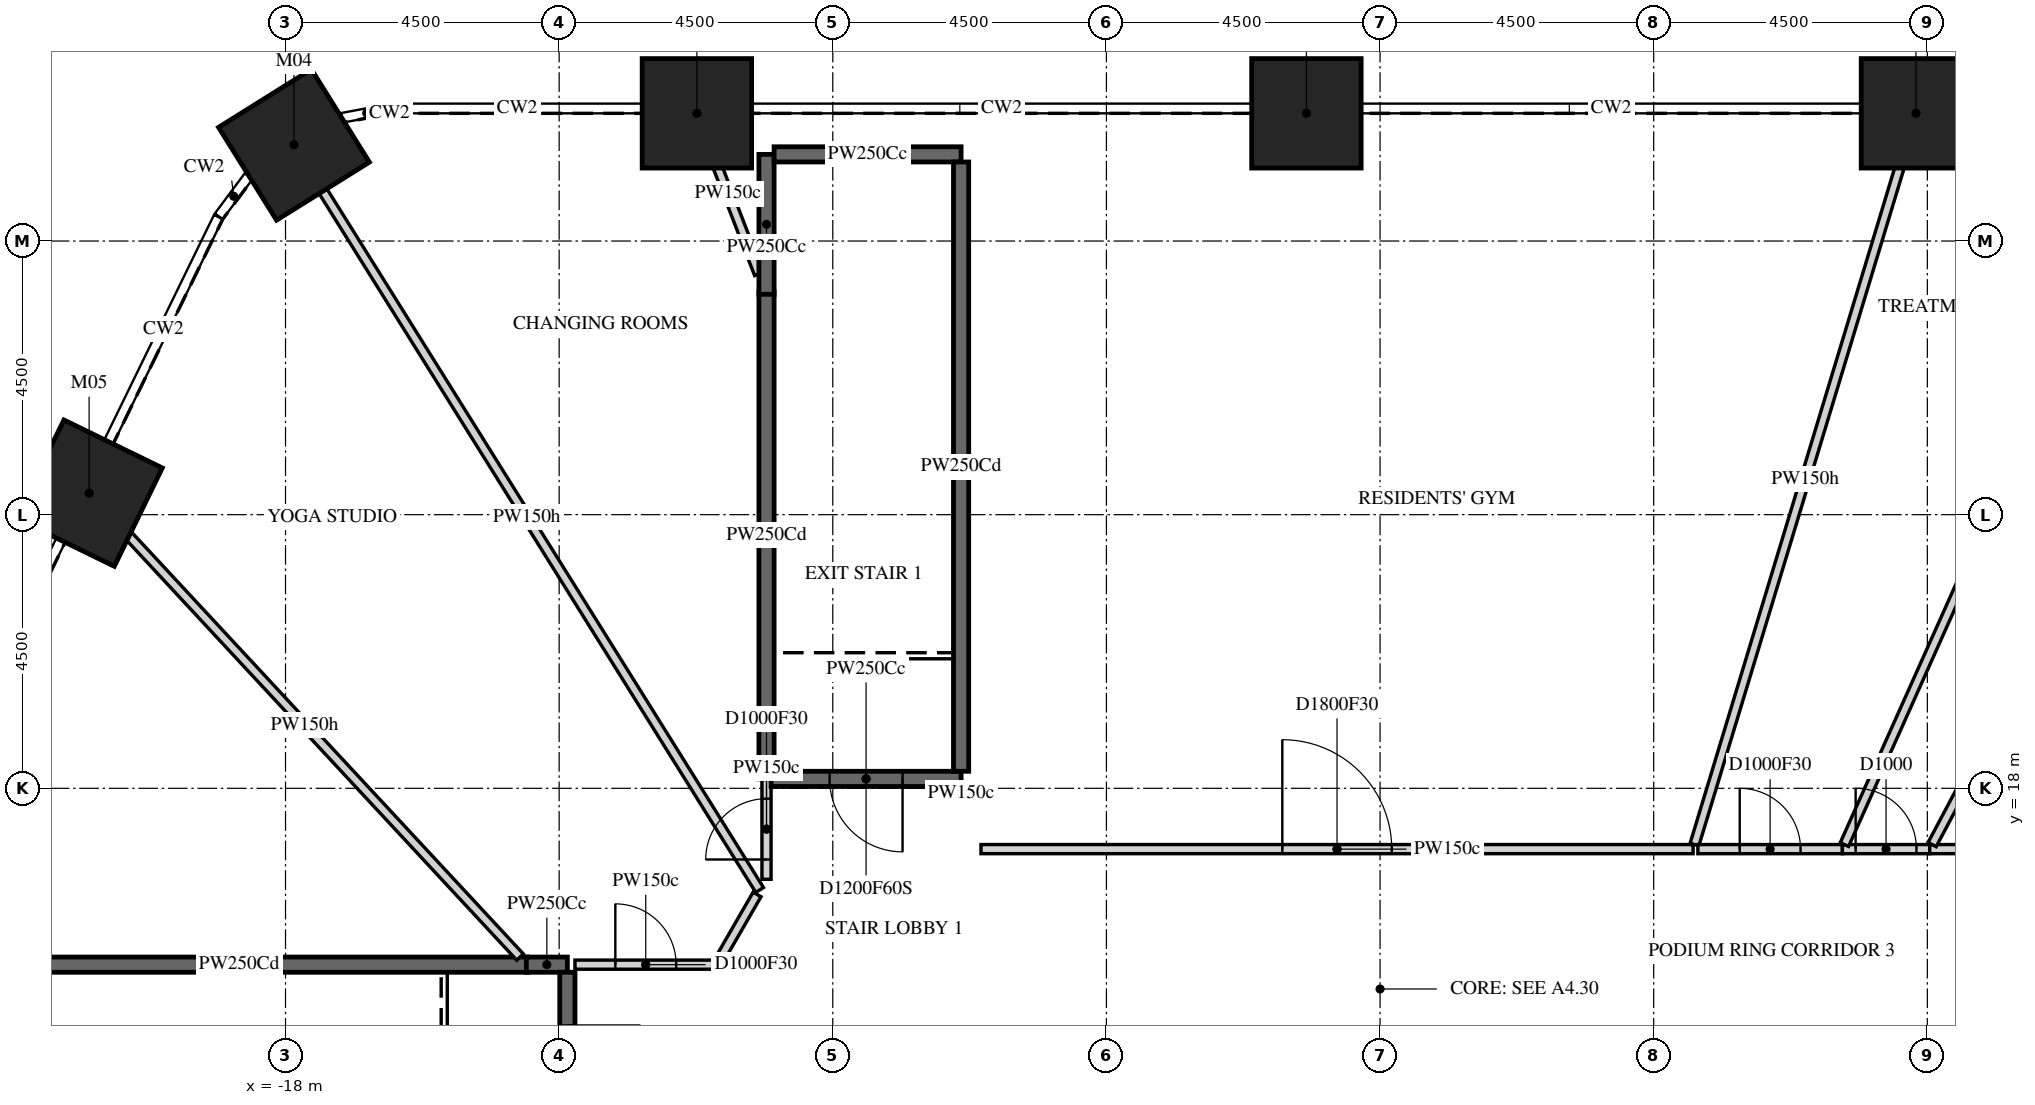
"""IFC4 building model, lengths in metres.
Left out: names, types, materials, properties, quantities, classifications, styles, units other than length and angle.
Written with IfcOpenShell. Run it as: python <this file> out.ifc"""

import sys

from ifc_helpers import new_model, si_unit, direction, frame, frame_2d, origin, origin_2d, place, context, subcontext, project, spatial, rectangle, extrude, element, fill, save


model = new_model("IFC4")
c1 = context("Model", 3, precision=1e-05, world=origin(), true_north=direction((0.0, 1.0)))
c2 = subcontext(c1, "Body", "Model", "MODEL_VIEW")
j1 = project(units=[si_unit("LENGTHUNIT", "METRE"), si_unit("PLANEANGLEUNIT", "RADIAN")], contexts=[c1])
p1 = place(None, origin())
s1 = spatial("IfcSite", under=j1, at=p1, CompositionType="ELEMENT")
p2 = place(p1, origin())
s2 = spatial("IfcBuilding", under=s1, at=p2, CompositionType="ELEMENT")
p3 = place(p2, frame((0.0, 0.0, 26.0)))
s3 = spatial("IfcBuildingStorey", under=s2, at=p3, CompositionType="ELEMENT", Elevation=26.0)
for number, where, z_axis, x_axis in (
    (1, (8.812, 29.1, -0.25), (0.0, 0.0, 1.0), (1.0, 0.0, 0.0)),
    (2, (-1.211, 29.1, -0.25), (0.0, 0.0, 1.0), (1.0, 0.0, 0.0)),
    (3, (-11.235, 29.1, -0.25), (0.0, 0.0, 1.0), (1.0, 0.0, 0.0)),
    (4, (-17.861, 28.583, -0.25), (0.0, 0.0, 1.0), (0.848, 0.53, 0.0)),
    (5, (-21.23, 22.854, -0.25), (0.0, 0.0, 1.0), (0.438, 0.899, 0.0)),
):
    element("IfcColumn", number, at=place(p3, frame(where, z_axis=z_axis, x_axis=x_axis)), inside=s3, PredefinedType="COLUMN", context=c2, shape_type="SweptSolid", body=[
        extrude(rectangle(XDim=1.8, YDim=1.8, at=origin_2d()), origin(), (0.0, 0.0, 1.0), 5.45),
    ])
p4 = place(p3, frame((-23.51, 15.1, 0.0), z_axis=(0.0, 0.0, 1.0), x_axis=(1.0, 0.0, 0.0)))
e6 = element("IfcWall", 6, at=p4, inside=s3, PredefinedType="PARTITIONING", context=c2, shape_type="SweptSolid", body=[
    extrude(rectangle(XDim=9.493, YDim=0.25, at=frame_2d((4.747, 0.0))), origin(), (0.0, 0.0, 1.0), 4.273),
])
p5 = place(p3, frame((-21.23, 22.854, 0.0), z_axis=(0.0, 0.0, 1.0), x_axis=(0.680602169668, -0.732653183057, 0.0)))
e7 = element("IfcWall", 7, at=p5, inside=s3, PredefinedType="PARTITIONING", context=c2, shape_type="SweptSolid", body=[
    extrude(rectangle(XDim=10.413, YDim=0.15, at=frame_2d((5.206, 0.0))), origin(), (0.0, 0.0, 1.0), 4.273),
])
p6 = place(p3, frame((-17.861, 28.584, 0.0), z_axis=(0.0, 0.0, 1.0), x_axis=(0.529906308886, -0.848056191418, 0.0)))
e8 = element("IfcWall", 8, at=p6, inside=s3, PredefinedType="PARTITIONING", context=c2, shape_type="SweptSolid", body=[
    extrude(rectangle(XDim=14.452, YDim=0.15, at=frame_2d((7.226, 0.0))), origin(), (0.0, 0.0, 1.0), 4.273),
])
p7 = place(p3, frame((-14.04, 15.1, 0.0), z_axis=(0.0, 0.0, 1.0), x_axis=(1.0, 0.0, 0.0)))
e9 = element("IfcWall", 9, at=p7, inside=s3, PredefinedType="PARTITIONING", context=c2, shape_type="SweptSolid", body=[
    extrude(rectangle(XDim=0.675, YDim=0.25, at=frame_2d((0.337, 0.0))), origin(), (0.0, 0.0, 1.0), 5.2),
])
p8 = place(p3, frame((-13.365, 14.975, 0.0), z_axis=(0.0, 0.0, 1.0), x_axis=(0.0, -1.0, 0.0)))
e10 = element("IfcWall", 10, at=p8, inside=s3, PredefinedType="PARTITIONING", context=c2, shape_type="SweptSolid", body=[
    extrude(rectangle(XDim=2.95, YDim=0.25, at=frame_2d((1.475, 0.0))), origin(), (0.0, 0.0, 1.0), 4.273),
])
p9 = place(p8, frame((0.875, 0.0, 0.0)))
e11 = element("IfcOpeningElement", 11, at=p9, cuts=e10, PredefinedType="OPENING", context=c2, shape_type="SweptSolid", body=[
    extrude(rectangle(XDim=1.2, YDim=2.1, at=frame_2d((0.6, 1.05))), frame((0.0, 0.135, 0.0), z_axis=(0.0, -1.0, 0.0), x_axis=(1.0, 0.0, 0.0)), (0.0, 0.0, 1.0), 0.27),
])
p10 = place(p3, frame((-13.24, 15.1, 0.0), z_axis=(0.0, 0.0, 1.0), x_axis=(1.0, 0.0, 0.0)))
e12 = element("IfcWall", 12, at=p10, inside=s3, PredefinedType="PARTITIONING", context=c2, shape_type="SweptSolid", body=[
    extrude(rectangle(XDim=2.328, YDim=0.15, at=frame_2d((1.164, 0.0))), origin(), (0.0, 0.0, 1.0), 5.2),
])
p11 = place(p10, frame((0.664, 0.0, 0.0)))
e13 = element("IfcOpeningElement", 13, at=p11, cuts=e12, PredefinedType="OPENING", context=c2, shape_type="SweptSolid", body=[
    extrude(rectangle(XDim=1.0, YDim=2.1, at=frame_2d((0.5, 1.05))), frame((0.0, 0.085, 0.0), z_axis=(0.0, -1.0, 0.0), x_axis=(1.0, 0.0, 0.0)), (0.0, 0.0, 1.0), 0.17),
])
p12 = place(p3, frame((-11.235, 29.1, 0.0), z_axis=(0.0, 0.0, 1.0), x_axis=(0.360128239505, -0.932902809038, 0.0)))
e14 = element("IfcWall", 14, at=p12, inside=s3, PredefinedType="PARTITIONING", context=c2, shape_type="SweptSolid", body=[
    extrude(rectangle(XDim=2.832, YDim=0.15, at=frame_2d((1.416, 0.0))), origin(), (0.0, 0.0, 1.0), 5.2),
])
p13 = place(p3, frame((-10.245, 16.254, 0.0), z_axis=(0.0, 0.0, 1.0), x_axis=(-0.50007851496, -0.865980068405, 0.0)))
e15 = element("IfcWall", 15, at=p13, inside=s3, PredefinedType="PARTITIONING", context=c2, shape_type="SweptSolid", body=[
    extrude(rectangle(XDim=1.246, YDim=0.15, at=frame_2d((0.623, 0.0))), origin(), (0.0, 0.0, 1.0), 5.2),
])
p14 = place(p3, frame((-10.09, 16.504, 0.0), z_axis=(0.0, 0.0, 1.0), x_axis=(0.0, 1.0, 0.0)))
e16 = element("IfcWall", 16, at=p14, inside=s3, PredefinedType="PARTITIONING", context=c2, shape_type="SweptSolid", body=[
    extrude(rectangle(XDim=1.651, YDim=0.15, at=frame_2d((0.826, 0.0))), origin(), (0.0, 0.0, 1.0), 5.2),
])
p15 = place(p14, frame((0.325, 0.0, 0.0)))
e17 = element("IfcOpeningElement", 17, at=p15, cuts=e16, PredefinedType="OPENING", context=c2, shape_type="SweptSolid", body=[
    extrude(rectangle(XDim=1.0, YDim=2.1, at=frame_2d((0.5, 1.05))), frame((0.0, 0.085, 0.0), z_axis=(0.0, -1.0, 0.0), x_axis=(1.0, 0.0, 0.0)), (0.0, 0.0, 1.0), 0.17),
])
p16 = place(p3, frame((-10.09, 18.155, 0.0), z_axis=(0.0, 0.0, 1.0), x_axis=(0.0, 1.0, 0.0)))
e18 = element("IfcWall", 18, at=p16, inside=s3, PredefinedType="PARTITIONING", context=c2, shape_type="SweptSolid", body=[
    extrude(rectangle(XDim=8.006, YDim=0.25, at=frame_2d((4.003, 0.0))), origin(), (0.0, 0.0, 1.0), 4.273),
])
p17 = place(p3, frame((-6.89, 18.155, 0.0), z_axis=(0.0, 0.0, 1.0), x_axis=(-1.0, 0.0, 0.0)))
e19 = element("IfcWall", 19, at=p17, inside=s3, PredefinedType="PARTITIONING", context=c2, shape_type="SweptSolid", body=[
    extrude(rectangle(XDim=3.125, YDim=0.25, at=frame_2d((1.562, 0.0))), origin(), (0.0, 0.0, 1.0), 5.2),
])
p18 = place(p17, frame((0.962, 0.0, 0.0)))
e20 = element("IfcOpeningElement", 20, at=p18, cuts=e19, PredefinedType="OPENING", context=c2, shape_type="SweptSolid", body=[
    extrude(rectangle(XDim=1.2, YDim=2.1, at=frame_2d((0.6, 1.05))), frame((0.0, 0.135, 0.0), z_axis=(0.0, -1.0, 0.0), x_axis=(1.0, 0.0, 0.0)), (0.0, 0.0, 1.0), 0.27),
])
p19 = place(p3, frame((-10.09, 26.124, 0.0), z_axis=(0.0, 0.0, 1.0), x_axis=(0.0, 1.0, 0.0)))
e21 = element("IfcWall", 21, at=p19, inside=s3, PredefinedType="PARTITIONING", context=c2, shape_type="SweptSolid", body=[
    extrude(rectangle(XDim=2.301, YDim=0.25, at=frame_2d((1.15, 0.0))), origin(), (0.0, 0.0, 1.0), 5.2),
])
p20 = place(p3, frame((-9.965, 28.425, 0.0), z_axis=(0.0, 0.0, 1.0), x_axis=(1.0, 0.0, 0.0)))
e22 = element("IfcWall", 22, at=p20, inside=s3, PredefinedType="PARTITIONING", context=c2, shape_type="SweptSolid", body=[
    extrude(rectangle(XDim=3.075, YDim=0.25, at=frame_2d((1.538, 0.0))), origin(), (0.0, 0.0, 1.0), 5.2),
])
p21 = place(p3, frame((-6.89, 18.03, 0.0), z_axis=(0.0, 0.0, 1.0), x_axis=(0.0, -1.0, 0.0)))
e23 = element("IfcWall", 23, at=p21, inside=s3, PredefinedType="PARTITIONING", context=c2, shape_type="SweptSolid", body=[
    extrude(rectangle(XDim=0.211, YDim=0.15, at=frame_2d((0.105, 0.0))), origin(), (0.0, 0.0, 1.0), 5.2),
])
p22 = place(p3, frame((-6.89, 28.3, 0.0), z_axis=(0.0, 0.0, 1.0), x_axis=(0.0, -1.0, 0.0)))
e24 = element("IfcWall", 24, at=p22, inside=s3, PredefinedType="PARTITIONING", context=c2, shape_type="SweptSolid", body=[
    extrude(rectangle(XDim=10.02, YDim=0.25, at=frame_2d((5.01, 0.0))), origin(), (0.0, 0.0, 1.0), 4.273),
])
p23 = place(p3, frame((-6.563, 17.0, 0.0), z_axis=(0.0, 0.0, 1.0), x_axis=(1.0, 0.0, 0.0)))
e25 = element("IfcWall", 25, at=p23, inside=s3, PredefinedType="PARTITIONING", context=c2, shape_type="SweptSolid", body=[
    extrude(rectangle(XDim=11.711, YDim=0.15, at=frame_2d((5.855, 0.0))), origin(), (0.0, 0.0, 1.0), 5.2),
])
p24 = place(p23, frame((4.956, 0.0, 0.0)))
e26 = element("IfcOpeningElement", 26, at=p24, cuts=e25, PredefinedType="OPENING", context=c2, shape_type="SweptSolid", body=[
    extrude(rectangle(XDim=1.8, YDim=2.1, at=frame_2d((0.9, 1.05))), frame((0.0, 0.085, 0.0), z_axis=(0.0, -1.0, 0.0), x_axis=(1.0, 0.0, 0.0)), (0.0, 0.0, 1.0), 0.17),
])
p25 = place(p3, frame((5.171, 17.075, 0.0), z_axis=(0.0, 0.0, 1.0), x_axis=(0.289887131616, 0.957060839719, 0.0)))
e27 = element("IfcWall", 27, at=p25, inside=s3, PredefinedType="PARTITIONING", context=c2, shape_type="SweptSolid", body=[
    extrude(rectangle(XDim=12.565, YDim=0.15, at=frame_2d((6.282, 0.0))), origin(), (0.0, 0.0, 1.0), 4.273),
])
p26 = place(p3, frame((5.226, 17.0, 0.0), z_axis=(0.0, 0.0, 1.0), x_axis=(1.0, 0.0, 0.0)))
e28 = element("IfcWall", 28, at=p26, inside=s3, PredefinedType="PARTITIONING", context=c2, shape_type="SweptSolid", body=[
    extrude(rectangle(XDim=2.377, YDim=0.15, at=frame_2d((1.188, 0.0))), origin(), (0.0, 0.0, 1.0), 5.2),
])
p27 = place(p26, frame((0.688, 0.0, 0.0)))
e29 = element("IfcOpeningElement", 29, at=p27, cuts=e28, PredefinedType="OPENING", context=c2, shape_type="SweptSolid", body=[
    extrude(rectangle(XDim=1.0, YDim=2.1, at=frame_2d((0.5, 1.05))), frame((0.0, 0.085, 0.0), z_axis=(0.0, -1.0, 0.0), x_axis=(1.0, 0.0, 0.0)), (0.0, 0.0, 1.0), 0.17),
])
p28 = place(p3, frame((7.603, 17.0, 0.0), z_axis=(0.0, 0.0, 1.0), x_axis=(1.0, 0.0, 0.0)))
e30 = element("IfcWall", 30, at=p28, inside=s3, PredefinedType="PARTITIONING", context=c2, shape_type="SweptSolid", body=[
    extrude(rectangle(XDim=1.436, YDim=0.15, at=frame_2d((0.718, 0.0))), origin(), (0.0, 0.0, 1.0), 5.2),
])
p29 = place(p28, frame((0.218, 0.0, 0.0)))
e31 = element("IfcOpeningElement", 31, at=p29, cuts=e30, PredefinedType="OPENING", context=c2, shape_type="SweptSolid", body=[
    extrude(rectangle(XDim=1.0, YDim=2.1, at=frame_2d((0.5, 1.05))), frame((0.0, 0.085, 0.0), z_axis=(0.0, -1.0, 0.0), x_axis=(1.0, 0.0, 0.0)), (0.0, 0.0, 1.0), 0.17),
])
p30 = place(p3, frame((9.815, 17.0, 0.0), z_axis=(0.0, 0.0, 1.0), x_axis=(-1.0, 0.0, 0.0)))
e32 = element("IfcWall", 32, at=p30, inside=s3, PredefinedType="PARTITIONING", context=c2, shape_type="SweptSolid", body=[
    extrude(rectangle(XDim=0.776, YDim=0.15, at=frame_2d((0.388, 0.0))), origin(), (0.0, 0.0, 1.0), 5.2),
])
p31 = place(p3, frame((13.015, 29.1, 0.0), z_axis=(0.0, 0.0, 1.0), x_axis=(-0.408286813769, -0.912853700054, 0.0)))
e33 = element("IfcWall", 33, at=p31, inside=s3, PredefinedType="PARTITIONING", context=c2, shape_type="SweptSolid", body=[
    extrude(rectangle(XDim=13.173, YDim=0.15, at=frame_2d((6.586, 0.0))), origin(), (0.0, 0.0, 1.0), 4.273),
])
p32 = place(p3, frame((15.261, 28.701, 0.0), z_axis=(0.0, 0.0, 1.0), x_axis=(-0.469500426527, -0.882932245131, 0.0)))
e34 = element("IfcWall", 34, at=p32, inside=s3, PredefinedType="PARTITIONING", context=c2, shape_type="SweptSolid", body=[
    extrude(rectangle(XDim=13.167, YDim=0.15, at=frame_2d((6.584, 0.0))), origin(), (0.0, 0.0, 1.0), 4.273),
])
p33 = place(p11, origin())
e35 = element("IfcDoor", 35, at=p33, inside=s3, OperationType="SINGLE_SWING_RIGHT", PredefinedType="DOOR", context=c2, shape_type="SweptSolid", body=[
    extrude(rectangle(XDim=1.0, YDim=2.1, at=frame_2d((0.5, 1.05))), frame((0.0, 0.025, 0.0), z_axis=(0.0, -1.0, 0.0), x_axis=(1.0, 0.0, 0.0)), (0.0, 0.0, 1.0), 0.05),
])
fill(e13, e35)
p34 = place(p15, origin())
e36 = element("IfcDoor", 36, at=p34, inside=s3, OperationType="SINGLE_SWING_LEFT", PredefinedType="DOOR", context=c2, shape_type="SweptSolid", body=[
    extrude(rectangle(XDim=1.0, YDim=2.1, at=frame_2d((0.5, 1.05))), frame((0.0, 0.025, 0.0), z_axis=(0.0, -1.0, 0.0), x_axis=(1.0, 0.0, 0.0)), (0.0, 0.0, 1.0), 0.05),
])
fill(e17, e36)
p35 = place(p18, origin())
e37 = element("IfcDoor", 37, at=p35, inside=s3, OperationType="SINGLE_SWING_RIGHT", PredefinedType="DOOR", context=c2, shape_type="SweptSolid", body=[
    extrude(rectangle(XDim=1.2, YDim=2.1, at=frame_2d((0.6, 1.05))), frame((0.0, 0.025, 0.0), z_axis=(0.0, -1.0, 0.0), x_axis=(1.0, 0.0, 0.0)), (0.0, 0.0, 1.0), 0.05),
])
fill(e20, e37)
p36 = place(p24, origin())
e38 = element("IfcDoor", 38, at=p36, inside=s3, OperationType="DOUBLE_DOOR_SINGLE_SWING", PredefinedType="DOOR", context=c2, shape_type="SweptSolid", body=[
    extrude(rectangle(XDim=1.8, YDim=2.1, at=frame_2d((0.9, 1.05))), frame((0.0, 0.025, 0.0), z_axis=(0.0, -1.0, 0.0), x_axis=(1.0, 0.0, 0.0)), (0.0, 0.0, 1.0), 0.05),
])
fill(e26, e38)
p37 = place(p27, origin())
e39 = element("IfcDoor", 39, at=p37, inside=s3, OperationType="SINGLE_SWING_LEFT", PredefinedType="DOOR", context=c2, shape_type="SweptSolid", body=[
    extrude(rectangle(XDim=1.0, YDim=2.1, at=frame_2d((0.5, 1.05))), frame((0.0, 0.025, 0.0), z_axis=(0.0, -1.0, 0.0), x_axis=(1.0, 0.0, 0.0)), (0.0, 0.0, 1.0), 0.05),
])
fill(e29, e39)
p38 = place(p29, origin())
e40 = element("IfcDoor", 40, at=p38, inside=s3, OperationType="SINGLE_SWING_RIGHT", PredefinedType="DOOR", context=c2, shape_type="SweptSolid", body=[
    extrude(rectangle(XDim=1.0, YDim=2.1, at=frame_2d((0.5, 1.05))), frame((0.0, 0.025, 0.0), z_axis=(0.0, -1.0, 0.0), x_axis=(1.0, 0.0, 0.0)), (0.0, 0.0, 1.0), 0.05),
])
fill(e31, e40)
save(model, sys.argv[1])
